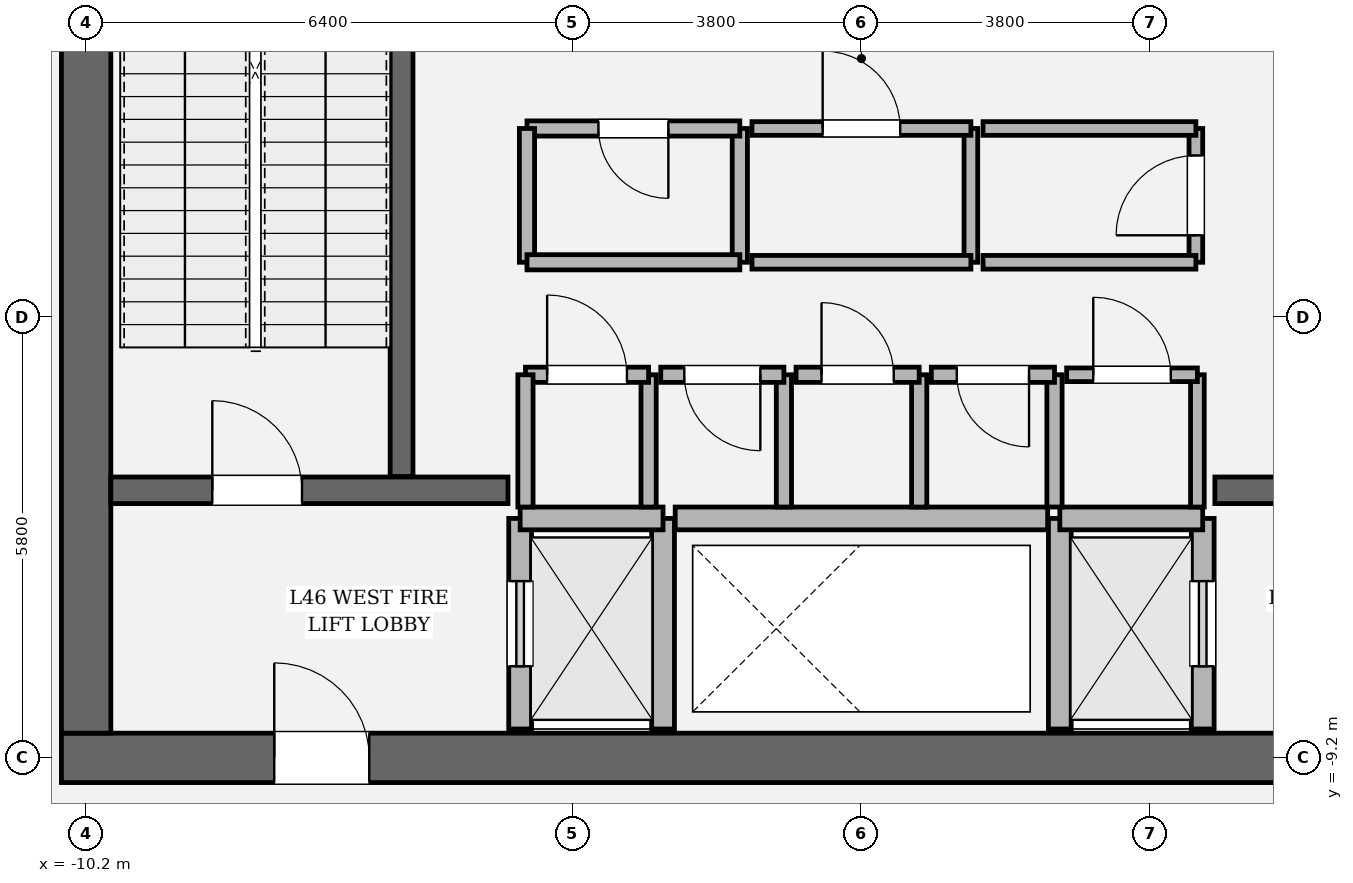
"""IFC4 building model, lengths in metres.
Left out: names, types, materials, properties, quantities, classifications, styles, units other than length and angle.
Written with IfcOpenShell. Run it as: python <this file> out.ifc"""

import sys

from ifc_helpers import new_model, si_unit, direction, frame, frame_2d, origin, place, context, subcontext, project, spatial, rectangle, extrude, element, fill, save


model = new_model("IFC4")
c1 = context("Model", 3, precision=1e-05, world=origin(), true_north=direction((0.0, 1.0)))
c2 = subcontext(c1, "Body", "Model", "MODEL_VIEW")
j1 = project(units=[si_unit("LENGTHUNIT", "METRE"), si_unit("PLANEANGLEUNIT", "RADIAN")], contexts=[c1])
p1 = place(None, origin())
s1 = spatial("IfcSite", under=j1, at=p1, CompositionType="ELEMENT")
p2 = place(p1, origin())
s2 = spatial("IfcBuilding", under=s1, at=p2, CompositionType="ELEMENT")
p3 = place(p2, frame((0.0, 0.0, 196.5)))
s3 = spatial("IfcBuildingStorey", under=s2, at=p3, CompositionType="ELEMENT", Elevation=196.5)
p4 = place(p3, frame((10.525, -9.2, 0.0), z_axis=(0.0, 0.0, 1.0), x_axis=(-1.0, 0.0, 0.0)))
e1 = element("IfcWall", 1, at=p4, inside=s3, PredefinedType="SHEAR", context=c2, shape_type="SweptSolid", body=[
    extrude(rectangle(XDim=21.05, YDim=0.65, at=frame_2d((10.525, 0.0))), origin(), (0.0, 0.0, 1.0), 4.05),
])
p5 = place(p4, frame((2.8, 0.0, 0.0)))
e2 = element("IfcOpeningElement", 2, at=p5, cuts=e1, PredefinedType="OPENING", context=c2, shape_type="SweptSolid", body=[
    extrude(rectangle(XDim=1.25, YDim=2.25, at=frame_2d((0.625, 1.125))), frame((0.0, 0.335, 0.0), z_axis=(0.0, -1.0, 0.0), x_axis=(1.0, 0.0, 0.0)), (0.0, 0.0, 1.0), 0.67),
])
p6 = place(p4, frame((17.0, 0.0, 0.0)))
e3 = element("IfcOpeningElement", 3, at=p6, cuts=e1, PredefinedType="OPENING", context=c2, shape_type="SweptSolid", body=[
    extrude(rectangle(XDim=1.25, YDim=2.25, at=frame_2d((0.625, 1.125))), frame((0.0, 0.335, 0.0), z_axis=(0.0, -1.0, 0.0), x_axis=(1.0, 0.0, 0.0)), (0.0, 0.0, 1.0), 0.67),
])
p7 = place(p3, frame((-10.2, -8.875, 0.0), z_axis=(0.0, 0.0, 1.0), x_axis=(0.0, 1.0, 0.0)))
e4 = element("IfcWall", 4, at=p7, inside=s3, PredefinedType="SHEAR", context=c2, shape_type="SweptSolid", body=[
    extrude(rectangle(XDim=17.75, YDim=0.65, at=frame_2d((8.875, 0.0))), origin(), (0.0, 0.0, 1.0), 4.05),
])
p8 = place(p7, frame((12.665, 0.0, 0.0)))
e5 = element("IfcOpeningElement", 5, at=p8, cuts=e4, PredefinedType="OPENING", context=c2, shape_type="SweptSolid", body=[
    extrude(rectangle(XDim=1.18, YDim=2.2, at=frame_2d((0.59, 1.1))), frame((0.0, 0.335, 0.0), z_axis=(0.0, -1.0, 0.0), x_axis=(1.0, 0.0, 0.0)), (0.0, 0.0, 1.0), 0.67),
])
p9 = place(p3, frame((-6.05, -5.5, 0.0), z_axis=(0.0, 0.0, 1.0), x_axis=(0.0, 1.0, 0.0)))
e6 = element("IfcWall", 6, at=p9, inside=s3, PredefinedType="SOLIDWALL", context=c2, shape_type="SweptSolid", body=[
    extrude(rectangle(XDim=8.95, YDim=0.3, at=frame_2d((4.475, 0.0))), origin(), (0.0, 0.0, 1.0), 4.05),
])
p10 = place(p3, frame((-9.875, -5.68, 0.0), z_axis=(0.0, 0.0, 1.0), x_axis=(1.0, 0.0, 0.0)))
e7 = element("IfcWall", 7, at=p10, inside=s3, PredefinedType="SOLIDWALL", context=c2, shape_type="SweptSolid", body=[
    extrude(rectangle(XDim=5.225, YDim=0.35, at=frame_2d((2.613, 0.0))), origin(), (0.0, 0.0, 1.0), 4.05),
])
p11 = place(p10, frame((1.335, 0.0, 0.0)))
e8 = element("IfcOpeningElement", 8, at=p11, cuts=e7, PredefinedType="OPENING", context=c2, shape_type="SweptSolid", body=[
    extrude(rectangle(XDim=1.18, YDim=2.2, at=frame_2d((0.59, 1.1))), frame((0.0, 0.185, 0.0), z_axis=(0.0, -1.0, 0.0), x_axis=(1.0, 0.0, 0.0)), (0.0, 0.0, 1.0), 0.37),
])
p12 = place(p3, frame((4.65, -5.68, 0.0), z_axis=(0.0, 0.0, 1.0), x_axis=(1.0, 0.0, 0.0)))
e9 = element("IfcWall", 9, at=p12, inside=s3, PredefinedType="SOLIDWALL", context=c2, shape_type="SweptSolid", body=[
    extrude(rectangle(XDim=5.225, YDim=0.35, at=frame_2d((2.613, 0.0))), origin(), (0.0, 0.0, 1.0), 4.05),
])
p13 = place(p12, frame((2.71, 0.0, 0.0)))
e10 = element("IfcOpeningElement", 10, at=p13, cuts=e9, PredefinedType="OPENING", context=c2, shape_type="SweptSolid", body=[
    extrude(rectangle(XDim=1.18, YDim=2.2, at=frame_2d((0.59, 1.1))), frame((0.0, 0.185, 0.0), z_axis=(0.0, -1.0, 0.0), x_axis=(1.0, 0.0, 0.0)), (0.0, 0.0, 1.0), 0.37),
])
p14 = place(p3, frame((-4.49, -8.82, 0.0), z_axis=(0.0, 0.0, 1.0), x_axis=(0.0, 1.0, 0.0)))
e11 = element("IfcWall", 11, at=p14, inside=s3, PredefinedType="SOLIDWALL", context=c2, shape_type="SweptSolid", body=[
    extrude(rectangle(XDim=2.77, YDim=0.3, at=frame_2d((1.385, 0.0))), origin(), (0.0, 0.0, 1.0), 3.83),
])
p15 = place(p14, frame((0.825, 0.0, 0.0)))
e12 = element("IfcOpeningElement", 12, at=p15, cuts=e11, PredefinedType="OPENING", context=c2, shape_type="SweptSolid", body=[
    extrude(rectangle(XDim=1.12, YDim=2.25, at=frame_2d((0.56, 1.125))), frame((0.0, 0.16, 0.0), z_axis=(0.0, -1.0, 0.0), x_axis=(1.0, 0.0, 0.0)), (0.0, 0.0, 1.0), 0.32),
])
p16 = place(p3, frame((-2.61, -8.82, 0.0), z_axis=(0.0, 0.0, 1.0), x_axis=(0.0, 1.0, 0.0)))
e13 = element("IfcWall", 13, at=p16, inside=s3, PredefinedType="SOLIDWALL", context=c2, shape_type="SweptSolid", body=[
    extrude(rectangle(XDim=2.77, YDim=0.3, at=frame_2d((1.385, 0.0))), origin(), (0.0, 0.0, 1.0), 3.83),
])
p17 = place(p3, frame((-4.49, -6.05, 0.0), z_axis=(0.0, 0.0, 1.0), x_axis=(1.0, 0.0, 0.0)))
e14 = element("IfcWall", 14, at=p17, inside=s3, PredefinedType="SOLIDWALL", context=c2, shape_type="SweptSolid", body=[
    extrude(rectangle(XDim=1.88, YDim=0.3, at=frame_2d((0.94, 0.0))), origin(), (0.0, 0.0, 1.0), 3.83),
])
p18 = place(p3, frame((4.49, -8.82, 0.0), z_axis=(0.0, 0.0, 1.0), x_axis=(0.0, 1.0, 0.0)))
e15 = element("IfcWall", 15, at=p18, inside=s3, PredefinedType="SOLIDWALL", context=c2, shape_type="SweptSolid", body=[
    extrude(rectangle(XDim=2.77, YDim=0.3, at=frame_2d((1.385, 0.0))), origin(), (0.0, 0.0, 1.0), 3.83),
])
p19 = place(p18, frame((0.825, 0.0, 0.0)))
e16 = element("IfcOpeningElement", 16, at=p19, cuts=e15, PredefinedType="OPENING", context=c2, shape_type="SweptSolid", body=[
    extrude(rectangle(XDim=1.12, YDim=2.25, at=frame_2d((0.56, 1.125))), frame((0.0, 0.16, 0.0), z_axis=(0.0, -1.0, 0.0), x_axis=(1.0, 0.0, 0.0)), (0.0, 0.0, 1.0), 0.32),
])
p20 = place(p3, frame((2.61, -8.82, 0.0), z_axis=(0.0, 0.0, 1.0), x_axis=(0.0, 1.0, 0.0)))
e17 = element("IfcWall", 17, at=p20, inside=s3, PredefinedType="SOLIDWALL", context=c2, shape_type="SweptSolid", body=[
    extrude(rectangle(XDim=2.77, YDim=0.3, at=frame_2d((1.385, 0.0))), origin(), (0.0, 0.0, 1.0), 3.83),
])
p21 = place(p3, frame((2.61, -6.05, 0.0), z_axis=(0.0, 0.0, 1.0), x_axis=(1.0, 0.0, 0.0)))
e18 = element("IfcWall", 18, at=p21, inside=s3, PredefinedType="SOLIDWALL", context=c2, shape_type="SweptSolid", body=[
    extrude(rectangle(XDim=1.88, YDim=0.3, at=frame_2d((0.94, 0.0))), origin(), (0.0, 0.0, 1.0), 3.83),
])
p22 = place(p3, frame((-2.45, -6.05, 0.0), z_axis=(0.0, 0.0, 1.0), x_axis=(1.0, 0.0, 0.0)))
e19 = element("IfcWall", 19, at=p22, inside=s3, PredefinedType="SOLIDWALL", context=c2, shape_type="SweptSolid", body=[
    extrude(rectangle(XDim=4.9, YDim=0.3, at=frame_2d((2.45, 0.0))), origin(), (0.0, 0.0, 1.0), 3.83),
])
p23 = place(p3, frame((-2.8, -5.9, 0.0), z_axis=(0.0, 0.0, 1.0), x_axis=(0.0, 1.0, 0.0)))
e20 = element("IfcWall", 20, at=p23, inside=s3, PredefinedType="SOLIDWALL", context=c2, shape_type="SweptSolid", body=[
    extrude(rectangle(XDim=1.74, YDim=0.2, at=frame_2d((0.87, 0.0))), origin(), (0.0, 0.0, 1.0), 3.83),
])
p24 = place(p3, frame((-2.8, -4.16, 0.0), z_axis=(0.0, 0.0, 1.0), x_axis=(-1.0, 0.0, 0.0)))
e21 = element("IfcWall", 21, at=p24, inside=s3, PredefinedType="SOLIDWALL", context=c2, shape_type="SweptSolid", body=[
    extrude(rectangle(XDim=1.62, YDim=0.2, at=frame_2d((0.81, 0.0))), origin(), (0.0, 0.0, 1.0), 3.83),
])
p25 = place(p24, frame((0.285, 0.0, 0.0)))
e22 = element("IfcOpeningElement", 22, at=p25, cuts=e21, PredefinedType="OPENING", context=c2, shape_type="SweptSolid", body=[
    extrude(rectangle(XDim=1.05, YDim=2.2, at=frame_2d((0.525, 1.1))), frame((0.0, 0.11, 0.0), z_axis=(0.0, -1.0, 0.0), x_axis=(1.0, 0.0, 0.0)), (0.0, 0.0, 1.0), 0.22),
])
for number, where, z_axis, x_axis in (
    (23, (-4.42, -4.16, 0.0), (0.0, 0.0, 1.0), (0.0, -1.0, 0.0)),
    (24, (-1.02, -5.9, 0.0), (0.0, 0.0, 1.0), (0.0, 1.0, 0.0)),
):
    element("IfcWall", number, at=place(p3, frame(where, z_axis=z_axis, x_axis=x_axis)), inside=s3, PredefinedType="SOLIDWALL", context=c2, shape_type="SweptSolid", body=[
        extrude(rectangle(XDim=1.74, YDim=0.2, at=frame_2d((0.87, 0.0))), origin(), (0.0, 0.0, 1.0), 3.83),
    ])
p26 = place(p3, frame((-1.02, -4.16, 0.0), z_axis=(0.0, 0.0, 1.0), x_axis=(-1.0, 0.0, 0.0)))
e25 = element("IfcWall", 25, at=p26, inside=s3, PredefinedType="SOLIDWALL", context=c2, shape_type="SweptSolid", body=[
    extrude(rectangle(XDim=1.62, YDim=0.2, at=frame_2d((0.81, 0.0))), origin(), (0.0, 0.0, 1.0), 3.83),
])
p27 = place(p26, frame((0.31, 0.0, 0.0)))
e26 = element("IfcOpeningElement", 26, at=p27, cuts=e25, PredefinedType="OPENING", context=c2, shape_type="SweptSolid", body=[
    extrude(rectangle(XDim=1.0, YDim=2.15, at=frame_2d((0.5, 1.075))), frame((0.0, 0.11, 0.0), z_axis=(0.0, -1.0, 0.0), x_axis=(1.0, 0.0, 0.0)), (0.0, 0.0, 1.0), 0.22),
])
p28 = place(p3, frame((0.76, -5.9, 0.0), z_axis=(0.0, 0.0, 1.0), x_axis=(0.0, 1.0, 0.0)))
e27 = element("IfcWall", 27, at=p28, inside=s3, PredefinedType="SOLIDWALL", context=c2, shape_type="SweptSolid", body=[
    extrude(rectangle(XDim=1.74, YDim=0.2, at=frame_2d((0.87, 0.0))), origin(), (0.0, 0.0, 1.0), 3.83),
])
p29 = place(p3, frame((0.76, -4.16, 0.0), z_axis=(0.0, 0.0, 1.0), x_axis=(-1.0, 0.0, 0.0)))
e28 = element("IfcWall", 28, at=p29, inside=s3, PredefinedType="SOLIDWALL", context=c2, shape_type="SweptSolid", body=[
    extrude(rectangle(XDim=1.62, YDim=0.2, at=frame_2d((0.81, 0.0))), origin(), (0.0, 0.0, 1.0), 3.83),
])
p30 = place(p29, frame((0.335, 0.0, 0.0)))
e29 = element("IfcOpeningElement", 29, at=p30, cuts=e28, PredefinedType="OPENING", context=c2, shape_type="SweptSolid", body=[
    extrude(rectangle(XDim=0.95, YDim=2.15, at=frame_2d((0.475, 1.075))), frame((0.0, 0.11, 0.0), z_axis=(0.0, -1.0, 0.0), x_axis=(1.0, 0.0, 0.0)), (0.0, 0.0, 1.0), 0.22),
])
p31 = place(p3, frame((2.54, -5.9, 0.0), z_axis=(0.0, 0.0, 1.0), x_axis=(0.0, 1.0, 0.0)))
e30 = element("IfcWall", 30, at=p31, inside=s3, PredefinedType="SOLIDWALL", context=c2, shape_type="SweptSolid", body=[
    extrude(rectangle(XDim=1.74, YDim=0.2, at=frame_2d((0.87, 0.0))), origin(), (0.0, 0.0, 1.0), 3.83),
])
p32 = place(p3, frame((2.54, -4.16, 0.0), z_axis=(0.0, 0.0, 1.0), x_axis=(-1.0, 0.0, 0.0)))
e31 = element("IfcWall", 31, at=p32, inside=s3, PredefinedType="SOLIDWALL", context=c2, shape_type="SweptSolid", body=[
    extrude(rectangle(XDim=1.62, YDim=0.2, at=frame_2d((0.81, 0.0))), origin(), (0.0, 0.0, 1.0), 3.83),
])
p33 = place(p32, frame((0.335, 0.0, 0.0)))
e32 = element("IfcOpeningElement", 32, at=p33, cuts=e31, PredefinedType="OPENING", context=c2, shape_type="SweptSolid", body=[
    extrude(rectangle(XDim=0.95, YDim=2.15, at=frame_2d((0.475, 1.075))), frame((0.0, 0.11, 0.0), z_axis=(0.0, -1.0, 0.0), x_axis=(1.0, 0.0, 0.0)), (0.0, 0.0, 1.0), 0.22),
])
p34 = place(p3, frame((4.42, -5.9, 0.0), z_axis=(0.0, 0.0, 1.0), x_axis=(0.0, 1.0, 0.0)))
e33 = element("IfcWall", 33, at=p34, inside=s3, PredefinedType="PARTITIONING", context=c2, shape_type="SweptSolid", body=[
    extrude(rectangle(XDim=1.74, YDim=0.18, at=frame_2d((0.87, 0.0))), origin(), (0.0, 0.0, 1.0), 3.83),
])
p35 = place(p3, frame((4.42, -4.16, 0.0), z_axis=(0.0, 0.0, 1.0), x_axis=(-1.0, 0.0, 0.0)))
e34 = element("IfcWall", 34, at=p35, inside=s3, PredefinedType="PARTITIONING", context=c2, shape_type="SweptSolid", body=[
    extrude(rectangle(XDim=1.72, YDim=0.18, at=frame_2d((0.86, 0.0))), origin(), (0.0, 0.0, 1.0), 3.83),
])
p36 = place(p35, frame((0.35, 0.0, 0.0)))
e35 = element("IfcOpeningElement", 35, at=p36, cuts=e34, PredefinedType="OPENING", context=c2, shape_type="SweptSolid", body=[
    extrude(rectangle(XDim=1.02, YDim=2.2, at=frame_2d((0.51, 1.1))), frame((0.0, 0.1, 0.0), z_axis=(0.0, -1.0, 0.0), x_axis=(1.0, 0.0, 0.0)), (0.0, 0.0, 1.0), 0.2),
])
p37 = place(p3, frame((-1.6, -2.68, 0.0), z_axis=(0.0, 0.0, 1.0), x_axis=(0.0, 1.0, 0.0)))
e36 = element("IfcWall", 36, at=p37, inside=s3, PredefinedType="SOLIDWALL", context=c2, shape_type="SweptSolid", body=[
    extrude(rectangle(XDim=1.76, YDim=0.2, at=frame_2d((0.88, 0.0))), origin(), (0.0, 0.0, 1.0), 3.83),
])
p38 = place(p3, frame((-1.6, -0.92, 0.0), z_axis=(0.0, 0.0, 1.0), x_axis=(-1.0, 0.0, 0.0)))
e37 = element("IfcWall", 37, at=p38, inside=s3, PredefinedType="SOLIDWALL", context=c2, shape_type="SweptSolid", body=[
    extrude(rectangle(XDim=2.8, YDim=0.2, at=frame_2d((1.4, 0.0))), origin(), (0.0, 0.0, 1.0), 3.83),
])
p39 = place(p38, frame((0.94, 0.0, 0.0)))
e38 = element("IfcOpeningElement", 38, at=p39, cuts=e37, PredefinedType="OPENING", context=c2, shape_type="SweptSolid", body=[
    extrude(rectangle(XDim=0.92, YDim=2.1, at=frame_2d((0.46, 1.05))), frame((0.0, 0.11, 0.0), z_axis=(0.0, -1.0, 0.0), x_axis=(1.0, 0.0, 0.0)), (0.0, 0.0, 1.0), 0.22),
])
p40 = place(p3, frame((-4.4, -0.92, 0.0), z_axis=(0.0, 0.0, 1.0), x_axis=(0.0, -1.0, 0.0)))
e39 = element("IfcWall", 39, at=p40, inside=s3, PredefinedType="SOLIDWALL", context=c2, shape_type="SweptSolid", body=[
    extrude(rectangle(XDim=1.76, YDim=0.2, at=frame_2d((0.88, 0.0))), origin(), (0.0, 0.0, 1.0), 3.83),
])
p41 = place(p3, frame((-4.4, -2.68, 0.0), z_axis=(0.0, 0.0, 1.0), x_axis=(1.0, 0.0, 0.0)))
e40 = element("IfcWall", 40, at=p41, inside=s3, PredefinedType="SOLIDWALL", context=c2, shape_type="SweptSolid", body=[
    extrude(rectangle(XDim=2.8, YDim=0.2, at=frame_2d((1.4, 0.0))), origin(), (0.0, 0.0, 1.0), 3.83),
])
p42 = place(p3, frame((1.44, -2.68, 0.0), z_axis=(0.0, 0.0, 1.0), x_axis=(0.0, 1.0, 0.0)))
e41 = element("IfcWall", 41, at=p42, inside=s3, PredefinedType="PARTITIONING", context=c2, shape_type="SweptSolid", body=[
    extrude(rectangle(XDim=1.76, YDim=0.18, at=frame_2d((0.88, 0.0))), origin(), (0.0, 0.0, 1.0), 3.83),
])
p43 = place(p3, frame((1.44, -0.92, 0.0), z_axis=(0.0, 0.0, 1.0), x_axis=(-1.0, 0.0, 0.0)))
e42 = element("IfcWall", 42, at=p43, inside=s3, PredefinedType="PARTITIONING", context=c2, shape_type="SweptSolid", body=[
    extrude(rectangle(XDim=2.88, YDim=0.18, at=frame_2d((1.44, 0.0))), origin(), (0.0, 0.0, 1.0), 3.83),
])
p44 = place(p43, frame((0.93, 0.0, 0.0)))
e43 = element("IfcOpeningElement", 43, at=p44, cuts=e42, PredefinedType="OPENING", context=c2, shape_type="SweptSolid", body=[
    extrude(rectangle(XDim=1.02, YDim=2.2, at=frame_2d((0.51, 1.1))), frame((0.0, 0.1, 0.0), z_axis=(0.0, -1.0, 0.0), x_axis=(1.0, 0.0, 0.0)), (0.0, 0.0, 1.0), 0.2),
])
p45 = place(p3, frame((-1.44, -2.68, 0.0), z_axis=(0.0, 0.0, 1.0), x_axis=(1.0, 0.0, 0.0)))
e44 = element("IfcWall", 44, at=p45, inside=s3, PredefinedType="PARTITIONING", context=c2, shape_type="SweptSolid", body=[
    extrude(rectangle(XDim=2.88, YDim=0.18, at=frame_2d((1.44, 0.0))), origin(), (0.0, 0.0, 1.0), 3.83),
])
p46 = place(p3, frame((4.4, -2.68, 0.0), z_axis=(0.0, 0.0, 1.0), x_axis=(0.0, 1.0, 0.0)))
e45 = element("IfcWall", 45, at=p46, inside=s3, PredefinedType="PARTITIONING", context=c2, shape_type="SweptSolid", body=[
    extrude(rectangle(XDim=1.76, YDim=0.18, at=frame_2d((0.88, 0.0))), origin(), (0.0, 0.0, 1.0), 3.83),
])
p47 = place(p46, frame((0.355, 0.0, 0.0)))
e46 = element("IfcOpeningElement", 46, at=p47, cuts=e45, PredefinedType="OPENING", context=c2, shape_type="SweptSolid", body=[
    extrude(rectangle(XDim=1.05, YDim=2.2, at=frame_2d((0.525, 1.1))), frame((0.0, 0.1, 0.0), z_axis=(0.0, -1.0, 0.0), x_axis=(1.0, 0.0, 0.0)), (0.0, 0.0, 1.0), 0.2),
])
for number, where, z_axis, x_axis in (
    (47, (4.4, -0.92, 0.0), (0.0, 0.0, 1.0), (-1.0, 0.0, 0.0)),
    (48, (1.6, -2.68, 0.0), (0.0, 0.0, 1.0), (1.0, 0.0, 0.0)),
):
    element("IfcWall", number, at=place(p3, frame(where, z_axis=z_axis, x_axis=x_axis)), inside=s3, PredefinedType="PARTITIONING", context=c2, shape_type="SweptSolid", body=[
        extrude(rectangle(XDim=2.8, YDim=0.18, at=frame_2d((1.4, 0.0))), origin(), (0.0, 0.0, 1.0), 3.83),
    ])
p48 = place(p11, origin())
e49 = element("IfcDoor", 49, at=p48, inside=s3, OperationType="SINGLE_SWING_LEFT", PredefinedType="DOOR", context=c2, shape_type="SweptSolid", body=[
    extrude(rectangle(XDim=1.18, YDim=2.2, at=frame_2d((0.59, 1.1))), frame((0.0, 0.025, 0.0), z_axis=(0.0, -1.0, 0.0), x_axis=(1.0, 0.0, 0.0)), (0.0, 0.0, 1.0), 0.05),
])
fill(e8, e49)
p49 = place(p6, origin())
e50 = element("IfcDoor", 50, at=p49, inside=s3, OperationType="SINGLE_SWING_RIGHT", PredefinedType="DOOR", context=c2, shape_type="SweptSolid", body=[
    extrude(rectangle(XDim=1.25, YDim=2.25, at=frame_2d((0.625, 1.125))), frame((0.0, 0.025, 0.0), z_axis=(0.0, -1.0, 0.0), x_axis=(1.0, 0.0, 0.0)), (0.0, 0.0, 1.0), 0.05),
])
fill(e3, e50)
p50 = place(p15, origin())
e51 = element("IfcDoor", 51, at=p50, inside=s3, OperationType="SLIDING_TO_LEFT", PredefinedType="DOOR", context=c2, shape_type="SweptSolid", body=[
    extrude(rectangle(XDim=1.12, YDim=2.25, at=frame_2d((0.56, 1.125))), frame((0.0, 0.025, 0.0), z_axis=(0.0, -1.0, 0.0), x_axis=(1.0, 0.0, 0.0)), (0.0, 0.0, 1.0), 0.05),
])
fill(e12, e51)
p51 = place(p19, origin())
e52 = element("IfcDoor", 52, at=p51, inside=s3, OperationType="SLIDING_TO_RIGHT", PredefinedType="DOOR", context=c2, shape_type="SweptSolid", body=[
    extrude(rectangle(XDim=1.12, YDim=2.25, at=frame_2d((0.56, 1.125))), frame((0.0, 0.025, 0.0), z_axis=(0.0, -1.0, 0.0), x_axis=(1.0, 0.0, 0.0)), (0.0, 0.0, 1.0), 0.05),
])
fill(e16, e52)
p52 = place(p25, origin())
e53 = element("IfcDoor", 53, at=p52, inside=s3, OperationType="SINGLE_SWING_RIGHT", PredefinedType="DOOR", context=c2, shape_type="SweptSolid", body=[
    extrude(rectangle(XDim=1.05, YDim=2.2, at=frame_2d((0.525, 1.1))), frame((0.0, 0.025, 0.0), z_axis=(0.0, -1.0, 0.0), x_axis=(1.0, 0.0, 0.0)), (0.0, 0.0, 1.0), 0.05),
])
fill(e22, e53)
p53 = place(p27, origin())
e54 = element("IfcDoor", 54, at=p53, inside=s3, OperationType="SINGLE_SWING_LEFT", PredefinedType="DOOR", context=c2, shape_type="SweptSolid", body=[
    extrude(rectangle(XDim=1.0, YDim=2.15, at=frame_2d((0.5, 1.075))), frame((0.0, 0.025, 0.0), z_axis=(0.0, -1.0, 0.0), x_axis=(1.0, 0.0, 0.0)), (0.0, 0.0, 1.0), 0.05),
])
fill(e26, e54)
p54 = place(p30, origin())
e55 = element("IfcDoor", 55, at=p54, inside=s3, OperationType="SINGLE_SWING_RIGHT", PredefinedType="DOOR", context=c2, shape_type="SweptSolid", body=[
    extrude(rectangle(XDim=0.95, YDim=2.15, at=frame_2d((0.475, 1.075))), frame((0.0, 0.025, 0.0), z_axis=(0.0, -1.0, 0.0), x_axis=(1.0, 0.0, 0.0)), (0.0, 0.0, 1.0), 0.05),
])
fill(e29, e55)
p55 = place(p33, origin())
e56 = element("IfcDoor", 56, at=p55, inside=s3, OperationType="SINGLE_SWING_LEFT", PredefinedType="DOOR", context=c2, shape_type="SweptSolid", body=[
    extrude(rectangle(XDim=0.95, YDim=2.15, at=frame_2d((0.475, 1.075))), frame((0.0, 0.025, 0.0), z_axis=(0.0, -1.0, 0.0), x_axis=(1.0, 0.0, 0.0)), (0.0, 0.0, 1.0), 0.05),
])
fill(e32, e56)
p56 = place(p36, origin())
e57 = element("IfcDoor", 57, at=p56, inside=s3, OperationType="SINGLE_SWING_RIGHT", PredefinedType="DOOR", context=c2, shape_type="SweptSolid", body=[
    extrude(rectangle(XDim=1.02, YDim=2.2, at=frame_2d((0.51, 1.1))), frame((0.0, 0.025, 0.0), z_axis=(0.0, -1.0, 0.0), x_axis=(1.0, 0.0, 0.0)), (0.0, 0.0, 1.0), 0.05),
])
fill(e35, e57)
p57 = place(p39, origin())
e58 = element("IfcDoor", 58, at=p57, inside=s3, OperationType="SINGLE_SWING_LEFT", PredefinedType="DOOR", context=c2, shape_type="SweptSolid", body=[
    extrude(rectangle(XDim=0.92, YDim=2.1, at=frame_2d((0.46, 1.05))), frame((0.0, 0.025, 0.0), z_axis=(0.0, -1.0, 0.0), x_axis=(1.0, 0.0, 0.0)), (0.0, 0.0, 1.0), 0.05),
])
fill(e38, e58)
p58 = place(p44, origin())
e59 = element("IfcDoor", 59, at=p58, inside=s3, OperationType="SINGLE_SWING_RIGHT", PredefinedType="DOOR", context=c2, shape_type="SweptSolid", body=[
    extrude(rectangle(XDim=1.02, YDim=2.2, at=frame_2d((0.51, 1.1))), frame((0.0, 0.025, 0.0), z_axis=(0.0, -1.0, 0.0), x_axis=(1.0, 0.0, 0.0)), (0.0, 0.0, 1.0), 0.05),
])
fill(e43, e59)
p59 = place(p47, origin())
e60 = element("IfcDoor", 60, at=p59, inside=s3, OperationType="SINGLE_SWING_LEFT", PredefinedType="DOOR", context=c2, shape_type="SweptSolid", body=[
    extrude(rectangle(XDim=1.05, YDim=2.2, at=frame_2d((0.525, 1.1))), frame((0.0, 0.025, 0.0), z_axis=(0.0, -1.0, 0.0), x_axis=(1.0, 0.0, 0.0)), (0.0, 0.0, 1.0), 0.05),
])
fill(e46, e60)
save(model, sys.argv[1])
